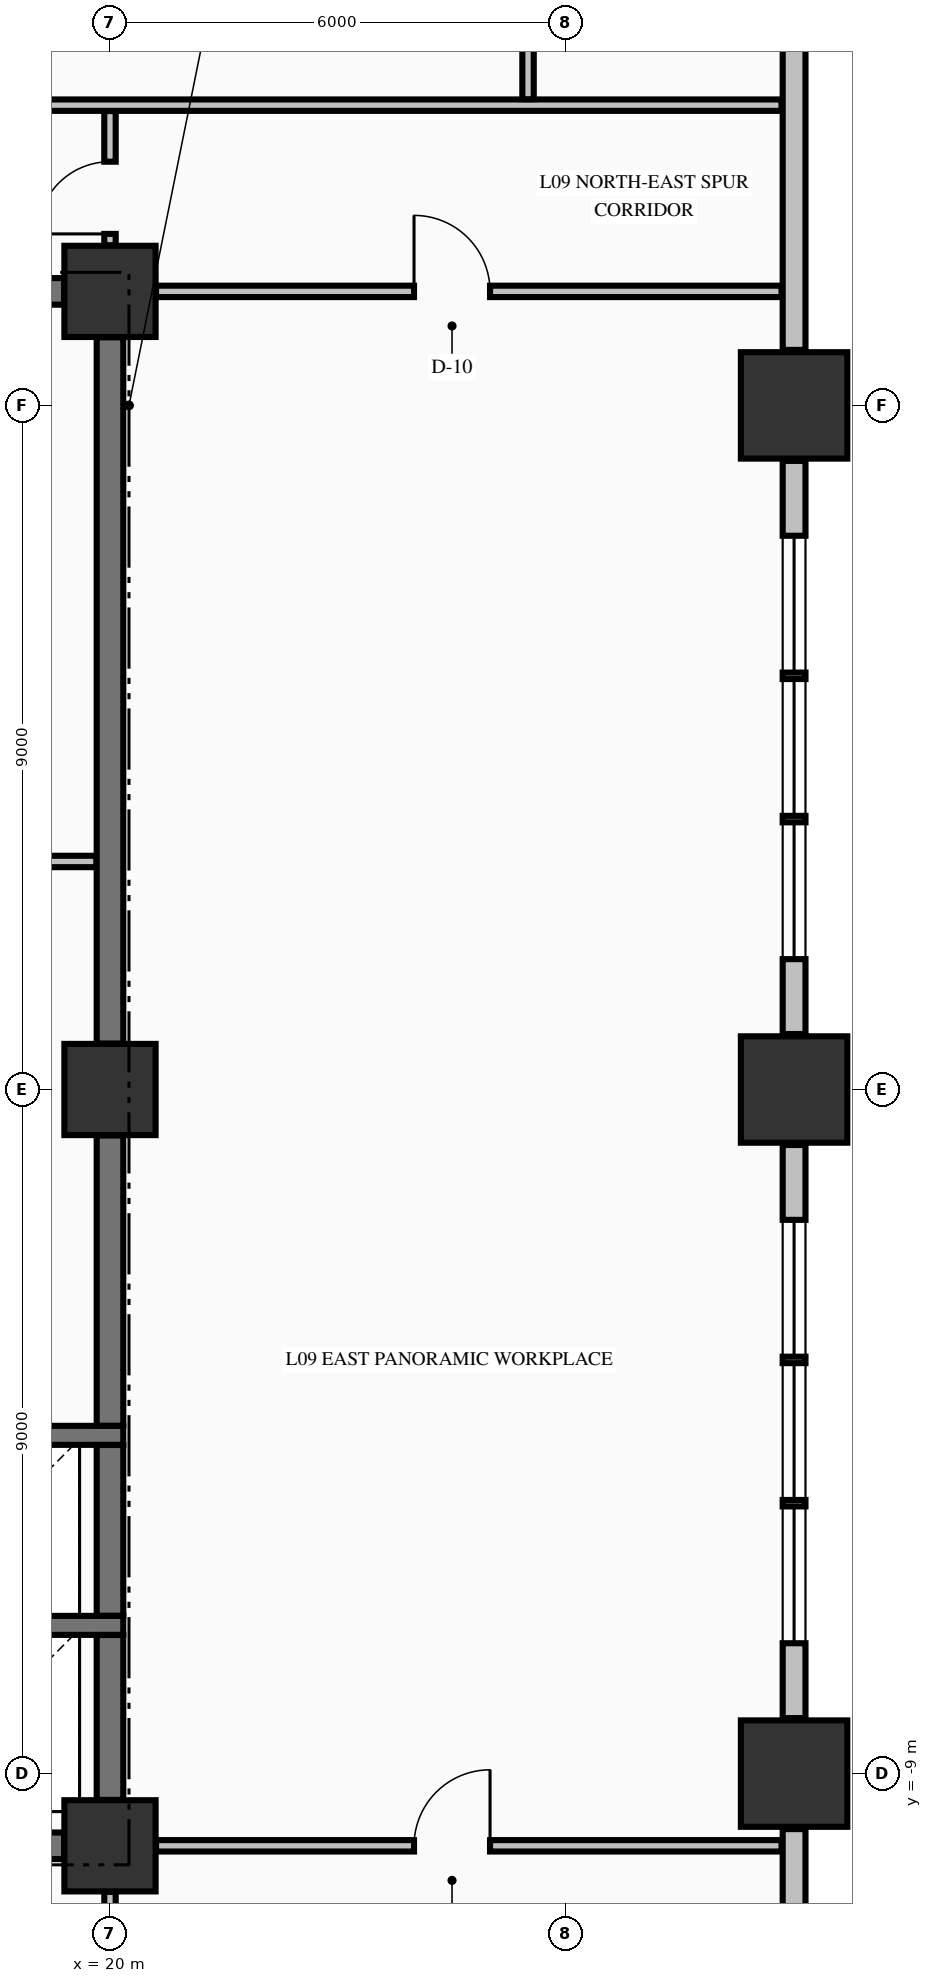
"""IFC4 building model, lengths in metres.
Left out: names, types, materials, properties, quantities, classifications, styles, units other than length and angle.
Written with IfcOpenShell. Run it as: python <this file> out.ifc"""

import sys

from ifc_helpers import new_model, si_unit, direction, frame, frame_2d, origin, origin_2d, place, context, subcontext, project, spatial, rectangle, extrude, element, fill, save


model = new_model("IFC4")
c1 = context("Model", 3, precision=1e-05, world=origin(), true_north=direction((0.0, 1.0)))
c2 = subcontext(c1, "Body", "Model", "MODEL_VIEW")
j1 = project(units=[si_unit("LENGTHUNIT", "METRE"), si_unit("PLANEANGLEUNIT", "RADIAN")], contexts=[c1])
p1 = place(None, origin())
s1 = spatial("IfcSite", under=j1, at=p1, CompositionType="ELEMENT")
p2 = place(p1, origin())
s2 = spatial("IfcBuilding", under=s1, at=p2, CompositionType="ELEMENT")
p3 = place(p2, frame((0.0, 0.0, 41.48)))
s3 = spatial("IfcBuildingStorey", under=s2, at=p3, CompositionType="ELEMENT", Elevation=41.48)
for number, where, z_axis, x_axis in (
    (1, (29.0, -9.0, -0.25), (0.0, 0.0, 1.0), (1.0, 0.0, 0.0)),
    (2, (29.0, 0.0, -0.25), (0.0, 0.0, 1.0), (1.0, 0.0, 0.0)),
    (3, (29.0, 9.0, -0.25), (0.0, 0.0, 1.0), (1.0, 0.0, 0.0)),
):
    element("IfcColumn", number, at=place(p3, frame(where, z_axis=z_axis, x_axis=x_axis)), inside=s3, PredefinedType="COLUMN", context=c2, shape_type="SweptSolid", body=[
        extrude(rectangle(XDim=1.4, YDim=1.4, at=origin_2d()), origin(), (0.0, 0.0, 1.0), 3.57),
    ])
for number, where, z_axis, x_axis in (
    (4, (20.0, -9.95, -0.25), (0.0, 0.0, 1.0), (1.0, 0.0, 0.0)),
    (5, (20.0, 10.5, -0.25), (0.0, 0.0, 1.0), (1.0, 0.0, 0.0)),
    (6, (20.0, 0.0, -0.25), (0.0, 0.0, 1.0), (1.0, 0.0, 0.0)),
):
    element("IfcColumn", number, at=place(p3, frame(where, z_axis=z_axis, x_axis=x_axis)), inside=s3, PredefinedType="COLUMN", context=c2, shape_type="SweptSolid", body=[
        extrude(rectangle(XDim=1.2, YDim=1.2, at=origin_2d()), origin(), (0.0, 0.0, 1.0), 3.57),
    ])
p4 = place(p3, frame((29.0, -22.27, 0.0), z_axis=(0.0, 0.0, 1.0), x_axis=(0.0, 1.0, 0.0)))
e7 = element("IfcWall", 7, at=p4, inside=s3, PredefinedType="STANDARD", context=c2, shape_type="SweptSolid", body=[
    extrude(rectangle(XDim=12.54, YDim=0.3, at=frame_2d((6.27, 0.0))), origin(), (0.0, 0.0, 1.0), 2.712),
])
p5 = place(p3, frame((29.0, -8.27, 0.0), z_axis=(0.0, 0.0, 1.0), x_axis=(0.0, 1.0, 0.0)))
e8 = element("IfcWall", 8, at=p5, inside=s3, PredefinedType="STANDARD", context=c2, shape_type="SweptSolid", body=[
    extrude(rectangle(XDim=7.54, YDim=0.3, at=frame_2d((3.77, 0.0))), origin(), (0.0, 0.0, 1.0), 2.712),
])
p6 = place(p5, frame((0.985, 0.0, 0.78)))
e9 = element("IfcOpeningElement", 9, at=p6, cuts=e8, PredefinedType="OPENING", context=c2, shape_type="SweptSolid", body=[
    extrude(rectangle(XDim=1.8, YDim=1.72, at=frame_2d((0.9, 0.86))), frame((0.0, 0.16, 0.0), z_axis=(0.0, -1.0, 0.0), x_axis=(1.0, 0.0, 0.0)), (0.0, 0.0, 1.0), 0.32),
])
p7 = place(p5, frame((2.87, 0.0, 0.78)))
e10 = element("IfcOpeningElement", 10, at=p7, cuts=e8, PredefinedType="OPENING", context=c2, shape_type="SweptSolid", body=[
    extrude(rectangle(XDim=1.8, YDim=1.72, at=frame_2d((0.9, 0.86))), frame((0.0, 0.16, 0.0), z_axis=(0.0, -1.0, 0.0), x_axis=(1.0, 0.0, 0.0)), (0.0, 0.0, 1.0), 0.32),
])
p8 = place(p5, frame((4.755, 0.0, 0.78)))
e11 = element("IfcOpeningElement", 11, at=p8, cuts=e8, PredefinedType="OPENING", context=c2, shape_type="SweptSolid", body=[
    extrude(rectangle(XDim=1.8, YDim=1.72, at=frame_2d((0.9, 0.86))), frame((0.0, 0.16, 0.0), z_axis=(0.0, -1.0, 0.0), x_axis=(1.0, 0.0, 0.0)), (0.0, 0.0, 1.0), 0.32),
])
p9 = place(p3, frame((29.0, 0.73, 0.0), z_axis=(0.0, 0.0, 1.0), x_axis=(0.0, 1.0, 0.0)))
e12 = element("IfcWall", 12, at=p9, inside=s3, PredefinedType="STANDARD", context=c2, shape_type="SweptSolid", body=[
    extrude(rectangle(XDim=7.54, YDim=0.3, at=frame_2d((3.77, 0.0))), origin(), (0.0, 0.0, 1.0), 2.712),
])
p10 = place(p9, frame((0.985, 0.0, 0.78)))
e13 = element("IfcOpeningElement", 13, at=p10, cuts=e12, PredefinedType="OPENING", context=c2, shape_type="SweptSolid", body=[
    extrude(rectangle(XDim=1.8, YDim=1.72, at=frame_2d((0.9, 0.86))), frame((0.0, 0.16, 0.0), z_axis=(0.0, -1.0, 0.0), x_axis=(1.0, 0.0, 0.0)), (0.0, 0.0, 1.0), 0.32),
])
p11 = place(p9, frame((2.87, 0.0, 0.78)))
e14 = element("IfcOpeningElement", 14, at=p11, cuts=e12, PredefinedType="OPENING", context=c2, shape_type="SweptSolid", body=[
    extrude(rectangle(XDim=1.8, YDim=1.72, at=frame_2d((0.9, 0.86))), frame((0.0, 0.16, 0.0), z_axis=(0.0, -1.0, 0.0), x_axis=(1.0, 0.0, 0.0)), (0.0, 0.0, 1.0), 0.32),
])
p12 = place(p9, frame((4.755, 0.0, 0.78)))
e15 = element("IfcOpeningElement", 15, at=p12, cuts=e12, PredefinedType="OPENING", context=c2, shape_type="SweptSolid", body=[
    extrude(rectangle(XDim=1.8, YDim=1.72, at=frame_2d((0.9, 0.86))), frame((0.0, 0.16, 0.0), z_axis=(0.0, -1.0, 0.0), x_axis=(1.0, 0.0, 0.0)), (0.0, 0.0, 1.0), 0.32),
])
p13 = place(p3, frame((29.0, 9.73, 0.0), z_axis=(0.0, 0.0, 1.0), x_axis=(0.0, 1.0, 0.0)))
e16 = element("IfcWall", 16, at=p13, inside=s3, PredefinedType="STANDARD", context=c2, shape_type="SweptSolid", body=[
    extrude(rectangle(XDim=12.54, YDim=0.3, at=frame_2d((6.27, 0.0))), origin(), (0.0, 0.0, 1.0), 2.712),
])
p14 = place(p3, frame((14.7, -9.95, 0.0), z_axis=(0.0, 0.0, 1.0), x_axis=(1.0, 0.0, 0.0)))
e17 = element("IfcWall", 17, at=p14, inside=s3, PredefinedType="SHEAR", context=c2, shape_type="SweptSolid", body=[
    extrude(rectangle(XDim=4.696, YDim=0.35, at=frame_2d((2.348, 0.0))), origin(), (0.0, 0.0, 1.0), 3.32),
])
p15 = place(p14, frame((0.8, 0.0, 0.0)))
e18 = element("IfcOpeningElement", 18, at=p15, cuts=e17, PredefinedType="OPENING", context=c2, shape_type="SweptSolid", body=[
    extrude(rectangle(XDim=0.9, YDim=2.15, at=frame_2d((0.45, 1.075))), frame((0.0, 0.185, 0.0), z_axis=(0.0, -1.0, 0.0), x_axis=(1.0, 0.0, 0.0)), (0.0, 0.0, 1.0), 0.37),
])
for number, where, z_axis, x_axis in (
    (19, (17.025, -7.05, 0.0), (0.0, 0.0, 1.0), (1.0, 0.0, 0.0)),
    (20, (17.025, -4.55, 0.0), (0.0, 0.0, 1.0), (1.0, 0.0, 0.0)),
):
    element("IfcWall", number, at=place(p3, frame(where, z_axis=z_axis, x_axis=x_axis)), inside=s3, PredefinedType="SOLIDWALL", context=c2, shape_type="SweptSolid", body=[
        extrude(rectangle(XDim=3.15, YDim=0.25, at=frame_2d((1.575, 0.0))), origin(), (0.0, 0.0, 1.0), 3.32),
    ])
p16 = place(p3, frame((14.7, 10.5, 0.0), z_axis=(0.0, 0.0, 1.0), x_axis=(1.0, 0.0, 0.0)))
e21 = element("IfcWall", 21, at=p16, inside=s3, PredefinedType="SHEAR", context=c2, shape_type="SweptSolid", body=[
    extrude(rectangle(XDim=4.696, YDim=0.35, at=frame_2d((2.348, 0.0))), origin(), (0.0, 0.0, 1.0), 3.32),
])
p17 = place(p16, frame((0.63, 0.0, 0.0)))
e22 = element("IfcOpeningElement", 22, at=p17, cuts=e21, PredefinedType="OPENING", context=c2, shape_type="SweptSolid", body=[
    extrude(rectangle(XDim=0.9, YDim=2.15, at=frame_2d((0.45, 1.075))), frame((0.0, 0.185, 0.0), z_axis=(0.0, -1.0, 0.0), x_axis=(1.0, 0.0, 0.0)), (0.0, 0.0, 1.0), 0.37),
])
p18 = place(p16, frame((3.27, 0.0, 0.0)))
e23 = element("IfcOpeningElement", 23, at=p18, cuts=e21, PredefinedType="OPENING", context=c2, shape_type="SweptSolid", body=[
    extrude(rectangle(XDim=0.9, YDim=2.15, at=frame_2d((0.45, 1.075))), frame((0.0, 0.185, 0.0), z_axis=(0.0, -1.0, 0.0), x_axis=(1.0, 0.0, 0.0)), (0.0, 0.0, 1.0), 0.37),
])
p19 = place(p3, frame((20.606, -9.95, 0.0), z_axis=(0.0, 0.0, 1.0), x_axis=(1.0, 0.0, 0.0)))
e24 = element("IfcWall", 24, at=p19, inside=s3, PredefinedType="PARTITIONING", context=c2, shape_type="SweptSolid", body=[
    extrude(rectangle(XDim=8.229, YDim=0.15, at=frame_2d((4.115, 0.0))), origin(), (0.0, 0.0, 1.0), 3.32),
])
p20 = place(p19, frame((3.394, 0.0, 0.0)))
e25 = element("IfcOpeningElement", 25, at=p20, cuts=e24, PredefinedType="OPENING", context=c2, shape_type="SweptSolid", body=[
    extrude(rectangle(XDim=1.0, YDim=2.15, at=frame_2d((0.5, 1.075))), frame((0.0, 0.085, 0.0), z_axis=(0.0, -1.0, 0.0), x_axis=(1.0, 0.0, 0.0)), (0.0, 0.0, 1.0), 0.17),
])
p21 = place(p3, frame((16.775, 3.0, 0.0), z_axis=(0.0, 0.0, 1.0), x_axis=(1.0, 0.0, 0.0)))
e26 = element("IfcWall", 26, at=p21, inside=s3, PredefinedType="PARTITIONING", context=c2, shape_type="SweptSolid", body=[
    extrude(rectangle(XDim=3.047, YDim=0.15, at=frame_2d((1.523, 0.0))), origin(), (0.0, 0.0, 1.0), 3.32),
])
p22 = place(p21, frame((1.17, 0.0, 0.0)))
e27 = element("IfcOpeningElement", 27, at=p22, cuts=e26, PredefinedType="OPENING", context=c2, shape_type="SweptSolid", body=[
    extrude(rectangle(XDim=0.95, YDim=2.15, at=frame_2d((0.475, 1.075))), frame((0.0, 0.085, 0.0), z_axis=(0.0, -1.0, 0.0), x_axis=(1.0, 0.0, 0.0)), (0.0, 0.0, 1.0), 0.17),
])
p23 = place(p3, frame((20.606, 10.5, 0.0), z_axis=(0.0, 0.0, 1.0), x_axis=(1.0, 0.0, 0.0)))
e28 = element("IfcWall", 28, at=p23, inside=s3, PredefinedType="PARTITIONING", context=c2, shape_type="SweptSolid", body=[
    extrude(rectangle(XDim=8.229, YDim=0.15, at=frame_2d((4.115, 0.0))), origin(), (0.0, 0.0, 1.0), 3.32),
])
p24 = place(p23, frame((3.394, 0.0, 0.0)))
e29 = element("IfcOpeningElement", 29, at=p24, cuts=e28, PredefinedType="OPENING", context=c2, shape_type="SweptSolid", body=[
    extrude(rectangle(XDim=1.0, YDim=2.15, at=frame_2d((0.5, 1.075))), frame((0.0, 0.085, 0.0), z_axis=(0.0, -1.0, 0.0), x_axis=(1.0, 0.0, 0.0)), (0.0, 0.0, 1.0), 0.17),
])
p25 = place(p3, frame((-23.835, 12.95, 0.0), z_axis=(0.0, 0.0, 1.0), x_axis=(1.0, 0.0, 0.0)))
e30 = element("IfcWall", 30, at=p25, inside=s3, PredefinedType="PARTITIONING", context=c2, shape_type="SweptSolid", body=[
    extrude(rectangle(XDim=52.67, YDim=0.15, at=frame_2d((26.335, 0.0))), origin(), (0.0, 0.0, 1.0), 3.32),
])
p26 = place(p25, frame((17.56, 0.0, 0.0)))
e31 = element("IfcOpeningElement", 31, at=p26, cuts=e30, PredefinedType="OPENING", context=c2, shape_type="SweptSolid", body=[
    extrude(rectangle(XDim=1.05, YDim=2.15, at=frame_2d((0.525, 1.075))), frame((0.0, 0.085, 0.0), z_axis=(0.0, -1.0, 0.0), x_axis=(1.0, 0.0, 0.0)), (0.0, 0.0, 1.0), 0.17),
])
p27 = place(p25, frame((31.16, 0.0, 0.0)))
e32 = element("IfcOpeningElement", 32, at=p27, cuts=e30, PredefinedType="OPENING", context=c2, shape_type="SweptSolid", body=[
    extrude(rectangle(XDim=1.05, YDim=2.15, at=frame_2d((0.525, 1.075))), frame((0.0, 0.085, 0.0), z_axis=(0.0, -1.0, 0.0), x_axis=(1.0, 0.0, 0.0)), (0.0, 0.0, 1.0), 0.17),
])
p28 = place(p3, frame((20.0, -9.346, 0.0), z_axis=(0.0, 0.0, 1.0), x_axis=(0.0, 1.0, 0.0)))
e33 = element("IfcWall", 33, at=p28, inside=s3, PredefinedType="SHEAR", context=c2, shape_type="SweptSolid", body=[
    extrude(rectangle(XDim=2.169, YDim=0.35, at=frame_2d((1.084, 0.0))), origin(), (0.0, 0.0, 1.0), 3.32),
])
p29 = place(p3, frame((20.0, -6.923, 0.0), z_axis=(0.0, 0.0, 1.0), x_axis=(0.0, 1.0, 0.0)))
e34 = element("IfcWall", 34, at=p29, inside=s3, PredefinedType="SHEAR", context=c2, shape_type="SweptSolid", body=[
    extrude(rectangle(XDim=2.246, YDim=0.35, at=frame_2d((1.123, 0.0))), origin(), (0.0, 0.0, 1.0), 3.32),
])
p30 = place(p3, frame((20.0, -4.423, 0.0), z_axis=(0.0, 0.0, 1.0), x_axis=(0.0, 1.0, 0.0)))
e35 = element("IfcWall", 35, at=p30, inside=s3, PredefinedType="SHEAR", context=c2, shape_type="SweptSolid", body=[
    extrude(rectangle(XDim=3.819, YDim=0.35, at=frame_2d((1.91, 0.0))), origin(), (0.0, 0.0, 1.0), 3.32),
])
p31 = place(p3, frame((20.0, 0.604, 0.0), z_axis=(0.0, 0.0, 1.0), x_axis=(0.0, 1.0, 0.0)))
e36 = element("IfcWall", 36, at=p31, inside=s3, PredefinedType="SHEAR", context=c2, shape_type="SweptSolid", body=[
    extrude(rectangle(XDim=9.292, YDim=0.35, at=frame_2d((4.646, 0.0))), origin(), (0.0, 0.0, 1.0), 3.32),
])
p32 = place(p3, frame((20.0, -13.022, 0.0), z_axis=(0.0, 0.0, 1.0), x_axis=(0.0, 1.0, 0.0)))
e37 = element("IfcWall", 37, at=p32, inside=s3, PredefinedType="PARTITIONING", context=c2, shape_type="SweptSolid", body=[
    extrude(rectangle(XDim=2.466, YDim=0.15, at=frame_2d((1.233, 0.0))), origin(), (0.0, 0.0, 1.0), 2.66),
])
p33 = place(p32, frame((1.027, 0.0, 0.0)))
e38 = element("IfcOpeningElement", 38, at=p33, cuts=e37, PredefinedType="OPENING", context=c2, shape_type="SweptSolid", body=[
    extrude(rectangle(XDim=0.95, YDim=2.15, at=frame_2d((0.475, 1.075))), frame((0.0, 0.085, 0.0), z_axis=(0.0, -1.0, 0.0), x_axis=(1.0, 0.0, 0.0)), (0.0, 0.0, 1.0), 0.17),
])
p34 = place(p3, frame((20.0, 11.106, 0.0), z_axis=(0.0, 0.0, 1.0), x_axis=(0.0, 1.0, 0.0)))
e39 = element("IfcWall", 39, at=p34, inside=s3, PredefinedType="PARTITIONING", context=c2, shape_type="SweptSolid", body=[
    extrude(rectangle(XDim=1.766, YDim=0.15, at=frame_2d((0.883, 0.0))), origin(), (0.0, 0.0, 1.0), 2.66),
])
p35 = place(p34, frame((0.15, 0.0, 0.0)))
e40 = element("IfcOpeningElement", 40, at=p35, cuts=e39, PredefinedType="OPENING", context=c2, shape_type="SweptSolid", body=[
    extrude(rectangle(XDim=0.95, YDim=2.15, at=frame_2d((0.475, 1.075))), frame((0.0, 0.085, 0.0), z_axis=(0.0, -1.0, 0.0), x_axis=(1.0, 0.0, 0.0)), (0.0, 0.0, 1.0), 0.17),
])
p36 = place(p3, frame((25.5, 13.028, 0.0), z_axis=(0.0, 0.0, 1.0), x_axis=(0.0, 1.0, 0.0)))
e41 = element("IfcWall", 41, at=p36, inside=s3, PredefinedType="PARTITIONING", context=c2, shape_type="SweptSolid", body=[
    extrude(rectangle(XDim=9.266, YDim=0.15, at=frame_2d((4.633, 0.0))), origin(), (0.0, 0.0, 1.0), 3.32),
])
p37 = place(p6, origin())
e42 = element("IfcWindow", 42, at=p37, inside=s3, PartitioningType="SINGLE_PANEL", PredefinedType="WINDOW", context=c2, shape_type="SweptSolid", body=[
    extrude(rectangle(XDim=1.8, YDim=1.72, at=frame_2d((0.9, 0.86))), frame((0.0, 0.03, 0.0), z_axis=(0.0, -1.0, 0.0), x_axis=(1.0, 0.0, 0.0)), (0.0, 0.0, 1.0), 0.06),
])
fill(e9, e42)
p38 = place(p7, origin())
e43 = element("IfcWindow", 43, at=p38, inside=s3, PartitioningType="SINGLE_PANEL", PredefinedType="WINDOW", context=c2, shape_type="SweptSolid", body=[
    extrude(rectangle(XDim=1.8, YDim=1.72, at=frame_2d((0.9, 0.86))), frame((0.0, 0.03, 0.0), z_axis=(0.0, -1.0, 0.0), x_axis=(1.0, 0.0, 0.0)), (0.0, 0.0, 1.0), 0.06),
])
fill(e10, e43)
p39 = place(p8, origin())
e44 = element("IfcWindow", 44, at=p39, inside=s3, PartitioningType="SINGLE_PANEL", PredefinedType="WINDOW", context=c2, shape_type="SweptSolid", body=[
    extrude(rectangle(XDim=1.8, YDim=1.72, at=frame_2d((0.9, 0.86))), frame((0.0, 0.03, 0.0), z_axis=(0.0, -1.0, 0.0), x_axis=(1.0, 0.0, 0.0)), (0.0, 0.0, 1.0), 0.06),
])
fill(e11, e44)
p40 = place(p10, origin())
e45 = element("IfcWindow", 45, at=p40, inside=s3, PartitioningType="SINGLE_PANEL", PredefinedType="WINDOW", context=c2, shape_type="SweptSolid", body=[
    extrude(rectangle(XDim=1.8, YDim=1.72, at=frame_2d((0.9, 0.86))), frame((0.0, 0.03, 0.0), z_axis=(0.0, -1.0, 0.0), x_axis=(1.0, 0.0, 0.0)), (0.0, 0.0, 1.0), 0.06),
])
fill(e13, e45)
p41 = place(p11, origin())
e46 = element("IfcWindow", 46, at=p41, inside=s3, PartitioningType="SINGLE_PANEL", PredefinedType="WINDOW", context=c2, shape_type="SweptSolid", body=[
    extrude(rectangle(XDim=1.8, YDim=1.72, at=frame_2d((0.9, 0.86))), frame((0.0, 0.03, 0.0), z_axis=(0.0, -1.0, 0.0), x_axis=(1.0, 0.0, 0.0)), (0.0, 0.0, 1.0), 0.06),
])
fill(e14, e46)
p42 = place(p12, origin())
e47 = element("IfcWindow", 47, at=p42, inside=s3, PartitioningType="SINGLE_PANEL", PredefinedType="WINDOW", context=c2, shape_type="SweptSolid", body=[
    extrude(rectangle(XDim=1.8, YDim=1.72, at=frame_2d((0.9, 0.86))), frame((0.0, 0.03, 0.0), z_axis=(0.0, -1.0, 0.0), x_axis=(1.0, 0.0, 0.0)), (0.0, 0.0, 1.0), 0.06),
])
fill(e15, e47)
p43 = place(p35, origin())
e48 = element("IfcDoor", 48, at=p43, inside=s3, OperationType="SINGLE_SWING_LEFT", PredefinedType="DOOR", context=c2, shape_type="SweptSolid", body=[
    extrude(rectangle(XDim=0.95, YDim=2.15, at=frame_2d((0.475, 1.075))), frame((0.0, 0.025, 0.0), z_axis=(0.0, -1.0, 0.0), x_axis=(1.0, 0.0, 0.0)), (0.0, 0.0, 1.0), 0.05),
])
fill(e40, e48)
p44 = place(p24, origin())
e49 = element("IfcDoor", 49, at=p44, inside=s3, OperationType="SINGLE_SWING_LEFT", PredefinedType="DOOR", context=c2, shape_type="SweptSolid", body=[
    extrude(rectangle(XDim=1.0, YDim=2.15, at=frame_2d((0.5, 1.075))), frame((0.0, 0.025, 0.0), z_axis=(0.0, -1.0, 0.0), x_axis=(1.0, 0.0, 0.0)), (0.0, 0.0, 1.0), 0.05),
])
fill(e29, e49)
p45 = place(p20, origin())
e50 = element("IfcDoor", 50, at=p45, inside=s3, OperationType="SINGLE_SWING_RIGHT", PredefinedType="DOOR", context=c2, shape_type="SweptSolid", body=[
    extrude(rectangle(XDim=1.0, YDim=2.15, at=frame_2d((0.5, 1.075))), frame((0.0, 0.025, 0.0), z_axis=(0.0, -1.0, 0.0), x_axis=(1.0, 0.0, 0.0)), (0.0, 0.0, 1.0), 0.05),
])
fill(e25, e50)
save(model, sys.argv[1])
